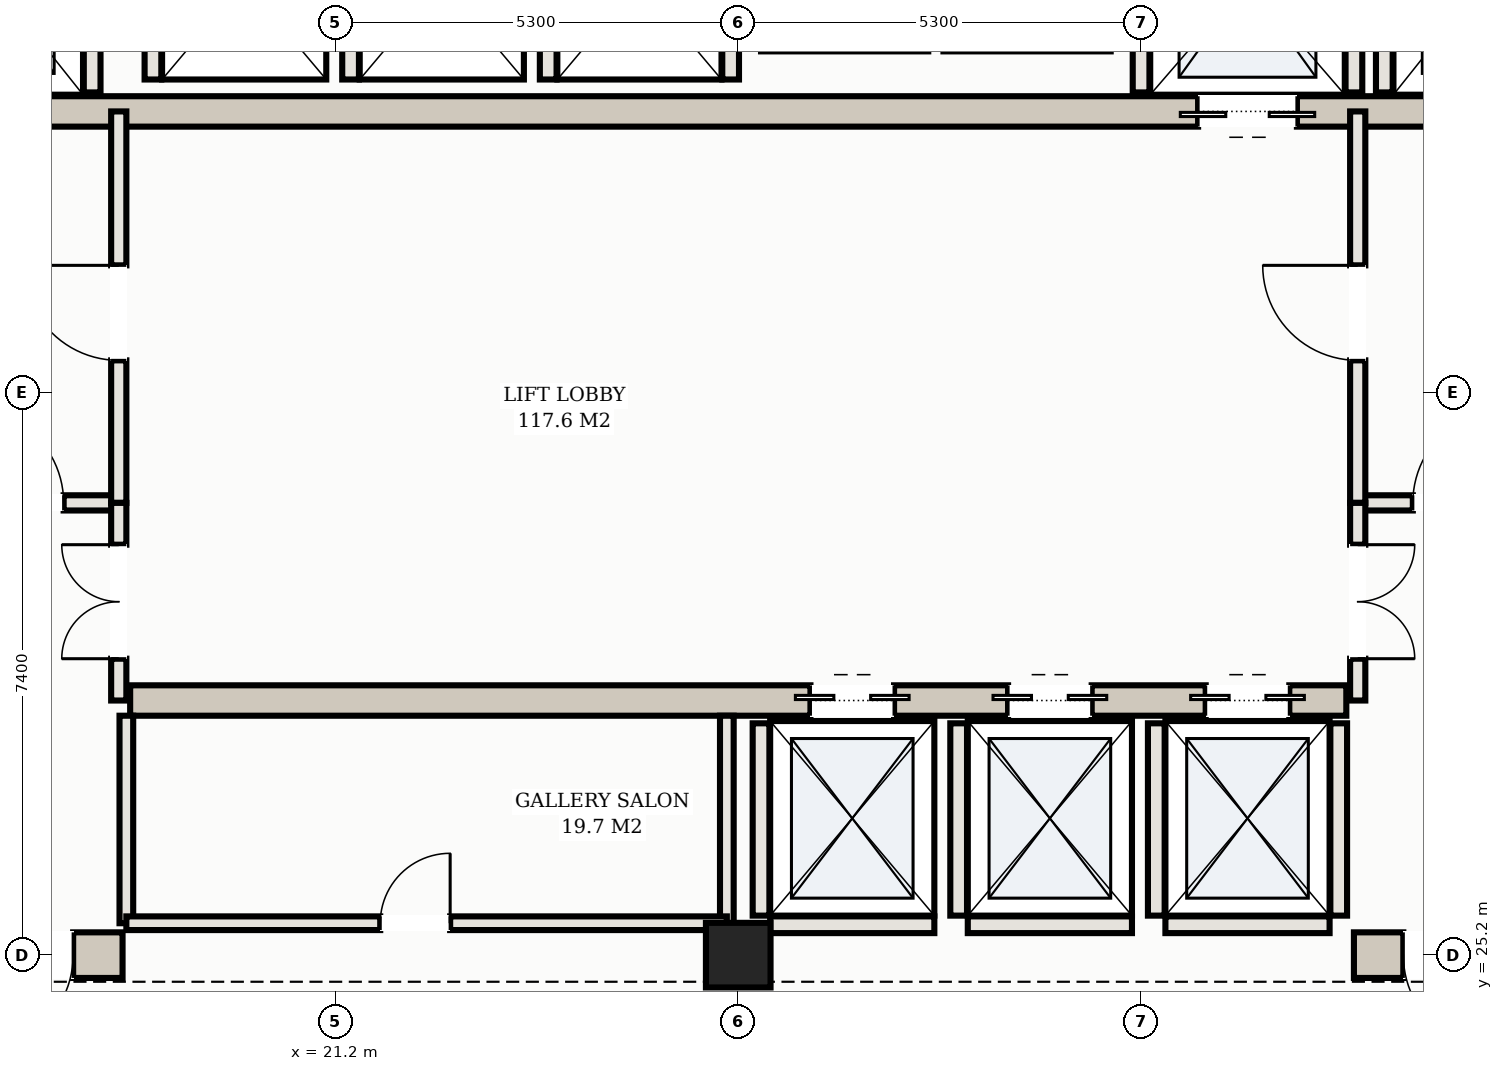
"""IFC4 building model, lengths in metres.
Left out: names, types, materials, properties, quantities, classifications, styles, units other than length and angle.
Written with IfcOpenShell. Run it as: python <this file> out.ifc"""

import sys

from ifc_helpers import new_model, si_unit, direction, frame, frame_2d, origin, origin_2d, place, context, subcontext, project, spatial, rectangle, hollow_rectangle, extrude, element, fill, save


model = new_model("IFC4")
c1 = context("Model", 3, precision=1e-05, world=origin(), true_north=direction((0.0, 1.0)))
c2 = subcontext(c1, "Body", "Model", "MODEL_VIEW")
j1 = project(units=[si_unit("LENGTHUNIT", "METRE"), si_unit("PLANEANGLEUNIT", "RADIAN")], contexts=[c1])
p1 = place(None, origin())
s1 = spatial("IfcSite", under=j1, at=p1, CompositionType="ELEMENT")
p2 = place(p1, origin())
s2 = spatial("IfcBuilding", under=s1, at=p2, CompositionType="ELEMENT")
p3 = place(p2, frame((0.0, 0.0, 172.2)))
s3 = spatial("IfcBuildingStorey", under=s2, at=p3, CompositionType="ELEMENT", Elevation=172.2)
p4 = place(p3, frame((10.3, 25.2, 0.0), z_axis=(0.0, 0.0, 1.0), x_axis=(1.0, 0.0, 0.0)))
e1 = element("IfcWall", 1, at=p4, inside=s3, PredefinedType="SHEAR", context=c2, shape_type="SweptSolid", body=[
    extrude(rectangle(XDim=8.1, YDim=0.6, at=frame_2d((4.05, 0.0))), origin(), (0.0, 0.0, 1.0), 3.1),
])
p5 = place(p4, frame((6.2, 0.0, 0.0)))
e2 = element("IfcOpeningElement", 2, at=p5, cuts=e1, PredefinedType="OPENING", context=c2, shape_type="SweptSolid", body=[
    extrude(rectangle(XDim=1.25, YDim=2.2, at=frame_2d((0.625, 1.1))), frame((0.0, 0.31, 0.0), z_axis=(0.0, -1.0, 0.0), x_axis=(1.0, 0.0, 0.0)), (0.0, 0.0, 1.0), 0.62),
])
p6 = place(p3, frame((34.6, 25.2, 0.0), z_axis=(0.0, 0.0, 1.0), x_axis=(1.0, 0.0, 0.0)))
e3 = element("IfcWall", 3, at=p6, inside=s3, PredefinedType="SHEAR", context=c2, shape_type="SweptSolid", body=[
    extrude(rectangle(XDim=8.1, YDim=0.6, at=frame_2d((4.05, 0.0))), origin(), (0.0, 0.0, 1.0), 3.1),
])
p7 = place(p6, frame((0.65, 0.0, 0.0)))
e4 = element("IfcOpeningElement", 4, at=p7, cuts=e3, PredefinedType="OPENING", context=c2, shape_type="SweptSolid", body=[
    extrude(rectangle(XDim=1.25, YDim=2.2, at=frame_2d((0.625, 1.1))), frame((0.0, 0.31, 0.0), z_axis=(0.0, -1.0, 0.0), x_axis=(1.0, 0.0, 0.0)), (0.0, 0.0, 1.0), 0.62),
])
p8 = place(p3, frame((15.5, 36.3, 0.0), z_axis=(0.0, 0.0, 1.0), x_axis=(1.0, 0.0, 0.0)))
e5 = element("IfcWall", 5, at=p8, inside=s3, PredefinedType="SHEAR", context=c2, shape_type="SweptSolid", body=[
    extrude(rectangle(XDim=22.0, YDim=0.4, at=frame_2d((11.0, 0.0))), origin(), (0.0, 0.0, 1.0), 3.1),
])
p9 = place(p8, frame((0.65, 0.0, 0.0)))
e6 = element("IfcOpeningElement", 6, at=p9, cuts=e5, PredefinedType="OPENING", context=c2, shape_type="SweptSolid", body=[
    extrude(rectangle(XDim=1.1, YDim=2.15, at=frame_2d((0.55, 1.075))), frame((0.0, 0.21, 0.0), z_axis=(0.0, -1.0, 0.0), x_axis=(1.0, 0.0, 0.0)), (0.0, 0.0, 1.0), 0.42),
])
p10 = place(p8, frame((20.25, 0.0, 0.0)))
e7 = element("IfcOpeningElement", 7, at=p10, cuts=e5, PredefinedType="OPENING", context=c2, shape_type="SweptSolid", body=[
    extrude(rectangle(XDim=1.1, YDim=2.15, at=frame_2d((0.55, 1.075))), frame((0.0, 0.21, 0.0), z_axis=(0.0, -1.0, 0.0), x_axis=(1.0, 0.0, 0.0)), (0.0, 0.0, 1.0), 0.42),
])
p11 = place(p8, frame((17.05, 0.0, 0.0)))
e8 = element("IfcOpeningElement", 8, at=p11, cuts=e5, PredefinedType="OPENING", context=c2, shape_type="SweptSolid", body=[
    extrude(rectangle(XDim=1.3, YDim=2.2, at=frame_2d((0.65, 1.1))), frame((0.0, 0.21, 0.0), z_axis=(0.0, -1.0, 0.0), x_axis=(1.0, 0.0, 0.0)), (0.0, 0.0, 1.0), 0.42),
])
p12 = place(p3, frame((18.5, 28.55, 0.0), z_axis=(0.0, 0.0, 1.0), x_axis=(1.0, 0.0, 0.0)))
e9 = element("IfcWall", 9, at=p12, inside=s3, PredefinedType="SHEAR", context=c2, shape_type="SweptSolid", body=[
    extrude(rectangle(XDim=16.0, YDim=0.4, at=frame_2d((8.0, 0.0))), origin(), (0.0, 0.0, 1.0), 3.1),
])
p13 = place(p12, frame((8.95, 0.0, 0.0)))
e10 = element("IfcOpeningElement", 10, at=p13, cuts=e9, PredefinedType="OPENING", context=c2, shape_type="SweptSolid", body=[
    extrude(rectangle(XDim=1.1, YDim=2.15, at=frame_2d((0.55, 1.075))), frame((0.0, 0.21, 0.0), z_axis=(0.0, -1.0, 0.0), x_axis=(1.0, 0.0, 0.0)), (0.0, 0.0, 1.0), 0.42),
])
p14 = place(p12, frame((11.55, 0.0, 0.0)))
e11 = element("IfcOpeningElement", 11, at=p14, cuts=e9, PredefinedType="OPENING", context=c2, shape_type="SweptSolid", body=[
    extrude(rectangle(XDim=1.1, YDim=2.15, at=frame_2d((0.55, 1.075))), frame((0.0, 0.21, 0.0), z_axis=(0.0, -1.0, 0.0), x_axis=(1.0, 0.0, 0.0)), (0.0, 0.0, 1.0), 0.42),
])
p15 = place(p12, frame((14.15, 0.0, 0.0)))
e12 = element("IfcOpeningElement", 12, at=p15, cuts=e9, PredefinedType="OPENING", context=c2, shape_type="SweptSolid", body=[
    extrude(rectangle(XDim=1.1, YDim=2.15, at=frame_2d((0.55, 1.075))), frame((0.0, 0.21, 0.0), z_axis=(0.0, -1.0, 0.0), x_axis=(1.0, 0.0, 0.0)), (0.0, 0.0, 1.0), 0.42),
])
p16 = place(p3, frame((26.5, 25.2, 0.0), z_axis=(0.0, 0.0, 1.0), x_axis=(1.0, 0.0, 0.0)))
e13 = element("IfcColumn", 13, at=p16, inside=s3, PredefinedType="COLUMN", context=c2, shape_type="SweptSolid", body=[
    extrude(hollow_rectangle(XDim=0.85, YDim=0.85, WallThickness=0.028, at=origin_2d()), origin(), (0.0, 0.0, 1.0), 3.3),
])
for number, where, z_axis, x_axis in (
    (14, (18.0, 36.55, 0.0), (0.0, 0.0, 1.0), (0.0, 1.0, 0.0)),
    (15, (35.0, 36.55, 0.0), (0.0, 0.0, 1.0), (0.0, 1.0, 0.0)),
    (16, (31.8, 36.55, 0.0), (0.0, 0.0, 1.0), (0.0, 1.0, 0.0)),
    (17, (34.6, 36.55, 0.0), (0.0, 0.0, 1.0), (0.0, 1.0, 0.0)),
):
    element("IfcWall", number, at=place(p3, frame(where, z_axis=z_axis, x_axis=x_axis)), inside=s3, PredefinedType="SOLIDWALL", context=c2, shape_type="SweptSolid", body=[
        extrude(rectangle(XDim=2.93, YDim=0.22, at=frame_2d((1.465, 0.0))), origin(), (0.0, 0.0, 1.0), 3.1),
    ])
p17 = place(p3, frame((26.8, 25.72, 0.0), z_axis=(0.0, 0.0, 1.0), x_axis=(0.0, 1.0, 0.0)))
e18 = element("IfcWall", 18, at=p17, inside=s3, PredefinedType="SOLIDWALL", context=c2, shape_type="SweptSolid", body=[
    extrude(rectangle(XDim=2.53, YDim=0.22, at=frame_2d((1.265, 0.0))), origin(), (0.0, 0.0, 1.0), 3.1),
])
p18 = place(p3, frame((26.92, 25.6, 0.0), z_axis=(0.0, 0.0, 1.0), x_axis=(1.0, 0.0, 0.0)))
e19 = element("IfcWall", 19, at=p18, inside=s3, PredefinedType="SOLIDWALL", context=c2, shape_type="SweptSolid", body=[
    extrude(rectangle(XDim=2.16, YDim=0.22, at=frame_2d((1.08, 0.0))), origin(), (0.0, 0.0, 1.0), 2.295),
])
p19 = place(p3, frame((29.4, 25.72, 0.0), z_axis=(0.0, 0.0, 1.0), x_axis=(0.0, 1.0, 0.0)))
e20 = element("IfcWall", 20, at=p19, inside=s3, PredefinedType="SOLIDWALL", context=c2, shape_type="SweptSolid", body=[
    extrude(rectangle(XDim=2.53, YDim=0.22, at=frame_2d((1.265, 0.0))), origin(), (0.0, 0.0, 1.0), 3.1),
])
p20 = place(p3, frame((29.52, 25.6, 0.0), z_axis=(0.0, 0.0, 1.0), x_axis=(1.0, 0.0, 0.0)))
e21 = element("IfcWall", 21, at=p20, inside=s3, PredefinedType="SOLIDWALL", context=c2, shape_type="SweptSolid", body=[
    extrude(rectangle(XDim=2.16, YDim=0.22, at=frame_2d((1.08, 0.0))), origin(), (0.0, 0.0, 1.0), 2.295),
])
for number, where, z_axis, x_axis in (
    (22, (32.0, 25.72, 0.0), (0.0, 0.0, 1.0), (0.0, 1.0, 0.0)),
    (23, (34.4, 25.72, 0.0), (0.0, 0.0, 1.0), (0.0, 1.0, 0.0)),
):
    element("IfcWall", number, at=place(p3, frame(where, z_axis=z_axis, x_axis=x_axis)), inside=s3, PredefinedType="SOLIDWALL", context=c2, shape_type="SweptSolid", body=[
        extrude(rectangle(XDim=2.53, YDim=0.22, at=frame_2d((1.265, 0.0))), origin(), (0.0, 0.0, 1.0), 3.1),
    ])
p21 = place(p3, frame((32.12, 25.6, 0.0), z_axis=(0.0, 0.0, 1.0), x_axis=(1.0, 0.0, 0.0)))
e24 = element("IfcWall", 24, at=p21, inside=s3, PredefinedType="SOLIDWALL", context=c2, shape_type="SweptSolid", body=[
    extrude(rectangle(XDim=2.16, YDim=0.22, at=frame_2d((1.08, 0.0))), origin(), (0.0, 0.0, 1.0), 2.295),
])
for number, where, z_axis, x_axis in (
    (25, (18.8, 36.72, 0.0), (0.0, 0.0, 1.0), (0.0, 1.0, 0.0)),
    (26, (21.4, 36.72, 0.0), (0.0, 0.0, 1.0), (0.0, 1.0, 0.0)),
    (27, (24.0, 36.72, 0.0), (0.0, 0.0, 1.0), (0.0, 1.0, 0.0)),
    (28, (26.4, 36.72, 0.0), (0.0, 0.0, 1.0), (0.0, 1.0, 0.0)),
):
    element("IfcWall", number, at=place(p3, frame(where, z_axis=z_axis, x_axis=x_axis)), inside=s3, PredefinedType="SOLIDWALL", context=c2, shape_type="SweptSolid", body=[
        extrude(rectangle(XDim=2.56, YDim=0.22, at=frame_2d((1.28, 0.0))), origin(), (0.0, 0.0, 1.0), 3.1),
    ])
p22 = place(p3, frame((15.1, 31.15, 0.0), z_axis=(0.0, 0.0, 1.0), x_axis=(1.0, 0.0, 0.0)))
e29 = element("IfcWall", 29, at=p22, inside=s3, PredefinedType="PARTITIONING", context=c2, shape_type="SweptSolid", body=[
    extrude(rectangle(XDim=3.25, YDim=0.2, at=frame_2d((1.625, 0.0))), origin(), (0.0, 0.0, 1.0), 2.38),
])
p23 = place(p22, frame((1.275, 0.0, 0.0)))
e30 = element("IfcOpeningElement", 30, at=p23, cuts=e29, PredefinedType="OPENING", context=c2, shape_type="SweptSolid", body=[
    extrude(rectangle(XDim=1.25, YDim=2.2, at=frame_2d((0.625, 1.1))), frame((0.0, 0.11, 0.0), z_axis=(0.0, -1.0, 0.0), x_axis=(1.0, 0.0, 0.0)), (0.0, 0.0, 1.0), 0.22),
])
p24 = place(p3, frame((18.35, 31.15, 0.0), z_axis=(0.0, 0.0, 1.0), x_axis=(0.0, 1.0, 0.0)))
e31 = element("IfcWall", 31, at=p24, inside=s3, PredefinedType="PARTITIONING", context=c2, shape_type="SweptSolid", body=[
    extrude(rectangle(XDim=5.15, YDim=0.2, at=frame_2d((2.575, 0.0))), origin(), (0.0, 0.0, 1.0), 2.38),
])
p25 = place(p24, frame((1.875, 0.0, 0.0)))
e32 = element("IfcOpeningElement", 32, at=p25, cuts=e31, PredefinedType="OPENING", context=c2, shape_type="SweptSolid", body=[
    extrude(rectangle(XDim=1.25, YDim=2.2, at=frame_2d((0.625, 1.1))), frame((0.0, 0.11, 0.0), z_axis=(0.0, -1.0, 0.0), x_axis=(1.0, 0.0, 0.0)), (0.0, 0.0, 1.0), 0.22),
])
p26 = place(p3, frame((34.65, 31.15, 0.0), z_axis=(0.0, 0.0, 1.0), x_axis=(1.0, 0.0, 0.0)))
e33 = element("IfcWall", 33, at=p26, inside=s3, PredefinedType="PARTITIONING", context=c2, shape_type="SweptSolid", body=[
    extrude(rectangle(XDim=3.25, YDim=0.2, at=frame_2d((1.625, 0.0))), origin(), (0.0, 0.0, 1.0), 2.38),
])
p27 = place(p26, frame((0.725, 0.0, 0.0)))
e34 = element("IfcOpeningElement", 34, at=p27, cuts=e33, PredefinedType="OPENING", context=c2, shape_type="SweptSolid", body=[
    extrude(rectangle(XDim=1.25, YDim=2.2, at=frame_2d((0.625, 1.1))), frame((0.0, 0.11, 0.0), z_axis=(0.0, -1.0, 0.0), x_axis=(1.0, 0.0, 0.0)), (0.0, 0.0, 1.0), 0.22),
])
p28 = place(p3, frame((34.65, 31.15, 0.0), z_axis=(0.0, 0.0, 1.0), x_axis=(0.0, 1.0, 0.0)))
e35 = element("IfcWall", 35, at=p28, inside=s3, PredefinedType="PARTITIONING", context=c2, shape_type="SweptSolid", body=[
    extrude(rectangle(XDim=5.15, YDim=0.2, at=frame_2d((2.575, 0.0))), origin(), (0.0, 0.0, 1.0), 2.38),
])
p29 = place(p28, frame((1.875, 0.0, 0.0)))
e36 = element("IfcOpeningElement", 36, at=p29, cuts=e35, PredefinedType="OPENING", context=c2, shape_type="SweptSolid", body=[
    extrude(rectangle(XDim=1.25, YDim=2.2, at=frame_2d((0.625, 1.1))), frame((0.0, 0.11, 0.0), z_axis=(0.0, -1.0, 0.0), x_axis=(1.0, 0.0, 0.0)), (0.0, 0.0, 1.0), 0.22),
])
p30 = place(p3, frame((18.35, 28.55, 0.0), z_axis=(0.0, 0.0, 1.0), x_axis=(0.0, 1.0, 0.0)))
e37 = element("IfcWall", 37, at=p30, inside=s3, PredefinedType="PARTITIONING", context=c2, shape_type="SweptSolid", body=[
    extrude(rectangle(XDim=2.6, YDim=0.2, at=frame_2d((1.3, 0.0))), origin(), (0.0, 0.0, 1.0), 2.38),
])
p31 = place(p30, frame((0.55, 0.0, 0.0)))
e38 = element("IfcOpeningElement", 38, at=p31, cuts=e37, PredefinedType="OPENING", context=c2, shape_type="SweptSolid", body=[
    extrude(rectangle(XDim=1.5, YDim=2.25, at=frame_2d((0.75, 1.125))), frame((0.0, 0.11, 0.0), z_axis=(0.0, -1.0, 0.0), x_axis=(1.0, 0.0, 0.0)), (0.0, 0.0, 1.0), 0.22),
])
p32 = place(p3, frame((34.65, 28.55, 0.0), z_axis=(0.0, 0.0, 1.0), x_axis=(0.0, 1.0, 0.0)))
e39 = element("IfcWall", 39, at=p32, inside=s3, PredefinedType="PARTITIONING", context=c2, shape_type="SweptSolid", body=[
    extrude(rectangle(XDim=2.6, YDim=0.2, at=frame_2d((1.3, 0.0))), origin(), (0.0, 0.0, 1.0), 2.38),
])
p33 = place(p32, frame((0.55, 0.0, 0.0)))
e40 = element("IfcOpeningElement", 40, at=p33, cuts=e39, PredefinedType="OPENING", context=c2, shape_type="SweptSolid", body=[
    extrude(rectangle(XDim=1.5, YDim=2.25, at=frame_2d((0.75, 1.125))), frame((0.0, 0.11, 0.0), z_axis=(0.0, -1.0, 0.0), x_axis=(1.0, 0.0, 0.0)), (0.0, 0.0, 1.0), 0.22),
])
for number, where, z_axis, x_axis in (
    (41, (18.45, 25.62, 0.0), (0.0, 0.0, 1.0), (0.0, 1.0, 0.0)),
    (42, (26.35, 25.62, 0.0), (0.0, 0.0, 1.0), (0.0, 1.0, 0.0)),
):
    element("IfcWall", number, at=place(p3, frame(where, z_axis=z_axis, x_axis=x_axis)), inside=s3, PredefinedType="PARTITIONING", context=c2, shape_type="SweptSolid", body=[
        extrude(rectangle(XDim=2.73, YDim=0.18, at=frame_2d((1.365, 0.0))), origin(), (0.0, 0.0, 1.0), 2.38),
    ])
p34 = place(p3, frame((18.45, 25.62, 0.0), z_axis=(0.0, 0.0, 1.0), x_axis=(1.0, 0.0, 0.0)))
e43 = element("IfcWall", 43, at=p34, inside=s3, PredefinedType="PARTITIONING", context=c2, shape_type="SweptSolid", body=[
    extrude(rectangle(XDim=7.9, YDim=0.18, at=frame_2d((3.95, 0.0))), origin(), (0.0, 0.0, 1.0), 2.38),
])
p35 = place(p34, frame((3.34, 0.0, 0.0)))
e44 = element("IfcOpeningElement", 44, at=p35, cuts=e43, PredefinedType="OPENING", context=c2, shape_type="SweptSolid", body=[
    extrude(rectangle(XDim=0.92, YDim=2.15, at=frame_2d((0.46, 1.075))), frame((0.0, 0.1, 0.0), z_axis=(0.0, -1.0, 0.0), x_axis=(1.0, 0.0, 0.0)), (0.0, 0.0, 1.0), 0.2),
])
p36 = place(p11, frame((1.3, 0.0, 0.0), z_axis=(0.0, 0.0, 1.0), x_axis=(-1.0, 0.0, 0.0)))
e45 = element("IfcDoor", 45, at=p36, inside=s3, OperationType="DOUBLE_DOOR_SLIDING", PredefinedType="DOOR", context=c2, shape_type="SweptSolid", body=[
    extrude(rectangle(XDim=1.3, YDim=2.2, at=frame_2d((0.65, 1.1))), frame((0.0, 0.025, 0.0), z_axis=(0.0, -1.0, 0.0), x_axis=(1.0, 0.0, 0.0)), (0.0, 0.0, 1.0), 0.05),
])
fill(e8, e45)
p37 = place(p13, origin())
e46 = element("IfcDoor", 46, at=p37, inside=s3, OperationType="DOUBLE_DOOR_SLIDING", PredefinedType="DOOR", context=c2, shape_type="SweptSolid", body=[
    extrude(rectangle(XDim=1.1, YDim=2.15, at=frame_2d((0.55, 1.075))), frame((0.0, 0.025, 0.0), z_axis=(0.0, -1.0, 0.0), x_axis=(1.0, 0.0, 0.0)), (0.0, 0.0, 1.0), 0.05),
])
fill(e10, e46)
p38 = place(p14, origin())
e47 = element("IfcDoor", 47, at=p38, inside=s3, OperationType="DOUBLE_DOOR_SLIDING", PredefinedType="DOOR", context=c2, shape_type="SweptSolid", body=[
    extrude(rectangle(XDim=1.1, YDim=2.15, at=frame_2d((0.55, 1.075))), frame((0.0, 0.025, 0.0), z_axis=(0.0, -1.0, 0.0), x_axis=(1.0, 0.0, 0.0)), (0.0, 0.0, 1.0), 0.05),
])
fill(e11, e47)
p39 = place(p15, origin())
e48 = element("IfcDoor", 48, at=p39, inside=s3, OperationType="DOUBLE_DOOR_SLIDING", PredefinedType="DOOR", context=c2, shape_type="SweptSolid", body=[
    extrude(rectangle(XDim=1.1, YDim=2.15, at=frame_2d((0.55, 1.075))), frame((0.0, 0.025, 0.0), z_axis=(0.0, -1.0, 0.0), x_axis=(1.0, 0.0, 0.0)), (0.0, 0.0, 1.0), 0.05),
])
fill(e12, e48)
p40 = place(p5, frame((1.25, 0.0, 0.0), z_axis=(0.0, 0.0, 1.0), x_axis=(-1.0, 0.0, 0.0)))
e49 = element("IfcDoor", 49, at=p40, inside=s3, OperationType="SINGLE_SWING_RIGHT", PredefinedType="DOOR", context=c2, shape_type="SweptSolid", body=[
    extrude(rectangle(XDim=1.25, YDim=2.2, at=frame_2d((0.625, 1.1))), frame((0.0, 0.025, 0.0), z_axis=(0.0, -1.0, 0.0), x_axis=(1.0, 0.0, 0.0)), (0.0, 0.0, 1.0), 0.05),
])
fill(e2, e49)
p41 = place(p7, frame((1.25, 0.0, 0.0), z_axis=(0.0, 0.0, 1.0), x_axis=(-1.0, 0.0, 0.0)))
e50 = element("IfcDoor", 50, at=p41, inside=s3, OperationType="SINGLE_SWING_LEFT", PredefinedType="DOOR", context=c2, shape_type="SweptSolid", body=[
    extrude(rectangle(XDim=1.25, YDim=2.2, at=frame_2d((0.625, 1.1))), frame((0.0, 0.025, 0.0), z_axis=(0.0, -1.0, 0.0), x_axis=(1.0, 0.0, 0.0)), (0.0, 0.0, 1.0), 0.05),
])
fill(e4, e50)
p42 = place(p23, origin())
e51 = element("IfcDoor", 51, at=p42, inside=s3, OperationType="SINGLE_SWING_LEFT", PredefinedType="DOOR", context=c2, shape_type="SweptSolid", body=[
    extrude(rectangle(XDim=1.25, YDim=2.2, at=frame_2d((0.625, 1.1))), frame((0.0, 0.025, 0.0), z_axis=(0.0, -1.0, 0.0), x_axis=(1.0, 0.0, 0.0)), (0.0, 0.0, 1.0), 0.05),
])
fill(e30, e51)
p43 = place(p25, origin())
e52 = element("IfcDoor", 52, at=p43, inside=s3, OperationType="SINGLE_SWING_RIGHT", PredefinedType="DOOR", context=c2, shape_type="SweptSolid", body=[
    extrude(rectangle(XDim=1.25, YDim=2.2, at=frame_2d((0.625, 1.1))), frame((0.0, 0.025, 0.0), z_axis=(0.0, -1.0, 0.0), x_axis=(1.0, 0.0, 0.0)), (0.0, 0.0, 1.0), 0.05),
])
fill(e32, e52)
p44 = place(p27, origin())
e53 = element("IfcDoor", 53, at=p44, inside=s3, OperationType="SINGLE_SWING_RIGHT", PredefinedType="DOOR", context=c2, shape_type="SweptSolid", body=[
    extrude(rectangle(XDim=1.25, YDim=2.2, at=frame_2d((0.625, 1.1))), frame((0.0, 0.025, 0.0), z_axis=(0.0, -1.0, 0.0), x_axis=(1.0, 0.0, 0.0)), (0.0, 0.0, 1.0), 0.05),
])
fill(e34, e53)
p45 = place(p29, origin())
e54 = element("IfcDoor", 54, at=p45, inside=s3, OperationType="SINGLE_SWING_RIGHT", PredefinedType="DOOR", context=c2, shape_type="SweptSolid", body=[
    extrude(rectangle(XDim=1.25, YDim=2.2, at=frame_2d((0.625, 1.1))), frame((0.0, 0.025, 0.0), z_axis=(0.0, -1.0, 0.0), x_axis=(1.0, 0.0, 0.0)), (0.0, 0.0, 1.0), 0.05),
])
fill(e36, e54)
p46 = place(p31, origin())
e55 = element("IfcDoor", 55, at=p46, inside=s3, OperationType="DOUBLE_DOOR_SINGLE_SWING", PredefinedType="DOOR", context=c2, shape_type="SweptSolid", body=[
    extrude(rectangle(XDim=1.5, YDim=2.25, at=frame_2d((0.75, 1.125))), frame((0.0, 0.025, 0.0), z_axis=(0.0, -1.0, 0.0), x_axis=(1.0, 0.0, 0.0)), (0.0, 0.0, 1.0), 0.05),
])
fill(e38, e55)
p47 = place(p33, frame((1.5, 0.0, 0.0), z_axis=(0.0, 0.0, 1.0), x_axis=(-1.0, 0.0, 0.0)))
e56 = element("IfcDoor", 56, at=p47, inside=s3, OperationType="DOUBLE_DOOR_SINGLE_SWING", PredefinedType="DOOR", context=c2, shape_type="SweptSolid", body=[
    extrude(rectangle(XDim=1.5, YDim=2.25, at=frame_2d((0.75, 1.125))), frame((0.0, 0.025, 0.0), z_axis=(0.0, -1.0, 0.0), x_axis=(1.0, 0.0, 0.0)), (0.0, 0.0, 1.0), 0.05),
])
fill(e40, e56)
p48 = place(p35, origin())
e57 = element("IfcDoor", 57, at=p48, inside=s3, OperationType="SINGLE_SWING_RIGHT", PredefinedType="DOOR", context=c2, shape_type="SweptSolid", body=[
    extrude(rectangle(XDim=0.92, YDim=2.15, at=frame_2d((0.46, 1.075))), frame((0.0, 0.025, 0.0), z_axis=(0.0, -1.0, 0.0), x_axis=(1.0, 0.0, 0.0)), (0.0, 0.0, 1.0), 0.05),
])
fill(e44, e57)
save(model, sys.argv[1])
